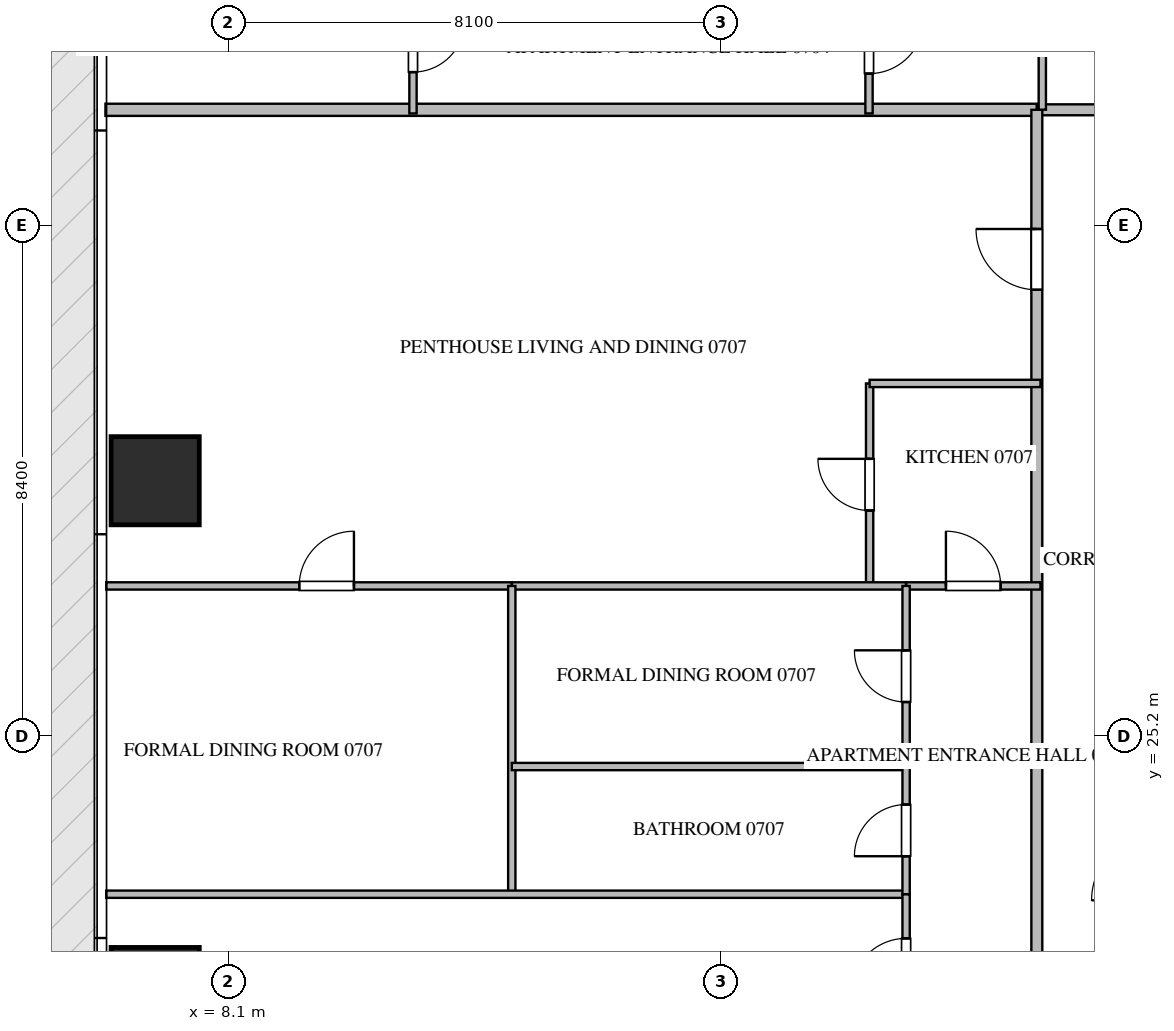
"""IFC4 building model, lengths in metres.
Left out: names, types, materials, properties, quantities, classifications, styles, units other than length and angle.
Written with IfcOpenShell. Run it as: python <this file> out.ifc"""

import sys

from ifc_helpers import new_model, si_unit, direction, frame, frame_2d, origin, origin_2d, place, context, subcontext, project, spatial, rectangle, extrude, source, transform, mapped, element, fill, save


model = new_model("IFC4")
c1 = context("Model", 3, precision=1e-05, world=origin(), true_north=direction((0.0, 1.0)))
c2 = subcontext(c1, "Body", "Model", "MODEL_VIEW")
j1 = project(units=[si_unit("LENGTHUNIT", "METRE"), si_unit("PLANEANGLEUNIT", "RADIAN")], contexts=[c1])
p1 = place(None, origin())
s1 = spatial("IfcSite", under=j1, at=p1, CompositionType="ELEMENT")
p2 = place(p1, origin())
s2 = spatial("IfcBuilding", under=s1, at=p2, CompositionType="ELEMENT")
p3 = place(p2, frame((0.0, 0.0, 34.2)))
s3 = spatial("IfcBuildingStorey", under=s2, at=p3, CompositionType="ELEMENT", Elevation=34.2)
m1 = source(origin(), c2, "Body", "SweptSolid", [
    extrude(rectangle(XDim=1.45, YDim=1.45, at=origin_2d()), origin(), (0.0, 0.0, 1.0), 3.75),
])
for number, where, z_axis, x_axis in (
    (1, (6.9, 21.0, -0.26), (0.0, 0.0, 1.0), (1.0, 0.0, 0.0)),
    (2, (6.9, 29.4, -0.26), (0.0, 0.0, 1.0), (1.0, 0.0, 0.0)),
):
    element("IfcColumn", number, at=place(p3, frame(where, z_axis=z_axis, x_axis=x_axis)), inside=s3, PredefinedType="COLUMN", context=c2, shape_type="MappedRepresentation", body=[
        mapped(m1, transform((0.0, 0.0, 0.0), scale=1.0)),
    ])
p4 = place(p3, frame((6.082, 35.5, 0.0), z_axis=(0.0, 0.0, 1.0), x_axis=(1.0, 0.0, 0.0)))
e3 = element("IfcWall", 3, at=p4, inside=s3, PredefinedType="PARTITIONING", context=c2, shape_type="SweptSolid", body=[
    extrude(rectangle(XDim=15.318, YDim=0.2, at=frame_2d((7.659, 0.0))), origin(), (0.0, 0.0, 1.0), 3.49),
])
p5 = place(p3, frame((21.402, 35.5, 0.0), z_axis=(0.0, 0.0, 1.0), x_axis=(1.0, 0.0, 0.0)))
e4 = element("IfcWall", 4, at=p5, inside=s3, PredefinedType="PARTITIONING", context=c2, shape_type="SweptSolid", body=[
    extrude(rectangle(XDim=21.996, YDim=0.18, at=frame_2d((10.998, 0.0))), origin(), (0.0, 0.0, 1.0), 3.49),
])
p6 = place(p5, frame((2.1, 0.0, 0.0)))
e5 = element("IfcOpeningElement", 5, at=p6, cuts=e4, PredefinedType="OPENING", context=c2, shape_type="SweptSolid", body=[
    extrude(rectangle(XDim=1.0, YDim=2.15, at=frame_2d((0.5, 1.075))), frame((0.0, 0.1, 0.0), z_axis=(0.0, -1.0, 0.0), x_axis=(1.0, 0.0, 0.0)), (0.0, 0.0, 1.0), 0.2),
])
p7 = place(p5, frame((14.277, 0.0, 0.0)))
e6 = element("IfcOpeningElement", 6, at=p7, cuts=e4, PredefinedType="OPENING", context=c2, shape_type="SweptSolid", body=[
    extrude(rectangle(XDim=1.0, YDim=2.15, at=frame_2d((0.5, 1.075))), frame((0.0, 0.1, 0.0), z_axis=(0.0, -1.0, 0.0), x_axis=(1.0, 0.0, 0.0)), (0.0, 0.0, 1.0), 0.2),
])
p8 = place(p5, frame((18.896, 0.0, 0.0)))
e7 = element("IfcOpeningElement", 7, at=p8, cuts=e4, PredefinedType="OPENING", context=c2, shape_type="SweptSolid", body=[
    extrude(rectangle(XDim=1.0, YDim=2.15, at=frame_2d((0.5, 1.075))), frame((0.0, 0.1, 0.0), z_axis=(0.0, -1.0, 0.0), x_axis=(1.0, 0.0, 0.0)), (0.0, 0.0, 1.0), 0.2),
])
p9 = place(p3, frame((21.4, 14.9, 0.0), z_axis=(0.0, 0.0, 1.0), x_axis=(0.0, 1.0, 0.0)))
e8 = element("IfcWall", 8, at=p9, inside=s3, PredefinedType="PARTITIONING", context=c2, shape_type="SweptSolid", body=[
    extrude(rectangle(XDim=20.6, YDim=0.18, at=frame_2d((10.3, 0.0))), origin(), (0.0, 0.0, 1.0), 3.49),
])
p10 = place(p9, frame((17.64, 0.0, 0.0)))
e9 = element("IfcOpeningElement", 9, at=p10, cuts=e8, PredefinedType="OPENING", context=c2, shape_type="SweptSolid", body=[
    extrude(rectangle(XDim=1.0, YDim=2.15, at=frame_2d((0.5, 1.075))), frame((0.0, 0.1, 0.0), z_axis=(0.0, -1.0, 0.0), x_axis=(1.0, 0.0, 0.0)), (0.0, 0.0, 1.0), 0.2),
])
p11 = place(p3, frame((21.49, 38.25, 0.0), z_axis=(0.0, 0.0, 1.0), x_axis=(0.0, -1.0, 0.0)))
e10 = element("IfcWall", 10, at=p11, inside=s3, PredefinedType="PARTITIONING", context=c2, shape_type="SweptSolid", body=[
    extrude(rectangle(XDim=2.748, YDim=0.12, at=frame_2d((1.374, 0.0))), origin(), (0.0, 0.0, 1.0), 3.49),
])
p12 = place(p3, frame((18.64, 37.65, 0.0), z_axis=(0.0, 0.0, 1.0), x_axis=(0.0, -1.0, 0.0)))
e11 = element("IfcWall", 11, at=p12, inside=s3, PredefinedType="PARTITIONING", context=c2, shape_type="SweptSolid", body=[
    extrude(rectangle(XDim=2.21, YDim=0.12, at=frame_2d((1.105, 0.0))), origin(), (0.0, 0.0, 1.0), 3.49),
])
p13 = place(p12, frame((0.655, 0.0, 0.0)))
e12 = element("IfcOpeningElement", 12, at=p13, cuts=e11, PredefinedType="OPENING", context=c2, shape_type="SweptSolid", body=[
    extrude(rectangle(XDim=0.9, YDim=2.1, at=frame_2d((0.45, 1.05))), frame((0.0, 0.07, 0.0), z_axis=(0.0, -1.0, 0.0), x_axis=(1.0, 0.0, 0.0)), (0.0, 0.0, 1.0), 0.14),
])
p14 = place(p3, frame((11.14, 37.65, 0.0), z_axis=(0.0, 0.0, 1.0), x_axis=(0.0, -1.0, 0.0)))
e13 = element("IfcWall", 13, at=p14, inside=s3, PredefinedType="PARTITIONING", context=c2, shape_type="SweptSolid", body=[
    extrude(rectangle(XDim=2.21, YDim=0.12, at=frame_2d((1.105, 0.0))), origin(), (0.0, 0.0, 1.0), 3.49),
])
p15 = place(p14, frame((0.68, 0.0, 0.0)))
e14 = element("IfcOpeningElement", 14, at=p15, cuts=e13, PredefinedType="OPENING", context=c2, shape_type="SweptSolid", body=[
    extrude(rectangle(XDim=0.85, YDim=2.1, at=frame_2d((0.425, 1.05))), frame((0.0, 0.07, 0.0), z_axis=(0.0, -1.0, 0.0), x_axis=(1.0, 0.0, 0.0)), (0.0, 0.0, 1.0), 0.14),
])
p16 = place(p3, frame((18.65, 27.67, 0.0), z_axis=(0.0, 0.0, 1.0), x_axis=(0.0, 1.0, 0.0)))
e15 = element("IfcWall", 15, at=p16, inside=s3, PredefinedType="PARTITIONING", context=c2, shape_type="SweptSolid", body=[
    extrude(rectangle(XDim=3.33, YDim=0.12, at=frame_2d((1.665, 0.0))), origin(), (0.0, 0.0, 1.0), 3.49),
])
p17 = place(p16, frame((1.24, 0.0, 0.0)))
e16 = element("IfcOpeningElement", 16, at=p17, cuts=e15, PredefinedType="OPENING", context=c2, shape_type="SweptSolid", body=[
    extrude(rectangle(XDim=0.85, YDim=2.1, at=frame_2d((0.425, 1.05))), frame((0.0, 0.07, 0.0), z_axis=(0.0, -1.0, 0.0), x_axis=(1.0, 0.0, 0.0)), (0.0, 0.0, 1.0), 0.14),
])
p18 = place(p3, frame((18.65, 31.0, 0.0), z_axis=(0.0, 0.0, 1.0), x_axis=(1.0, 0.0, 0.0)))
e17 = element("IfcWall", 17, at=p18, inside=s3, PredefinedType="PARTITIONING", context=c2, shape_type="SweptSolid", body=[
    extrude(rectangle(XDim=2.81, YDim=0.12, at=frame_2d((1.405, 0.0))), origin(), (0.0, 0.0, 1.0), 3.49),
])
p19 = place(p3, frame((19.25, 27.67, 0.0), z_axis=(0.0, 0.0, 1.0), x_axis=(1.0, 0.0, 0.0)))
e18 = element("IfcWall", 18, at=p19, inside=s3, PredefinedType="PARTITIONING", context=c2, shape_type="SweptSolid", body=[
    extrude(rectangle(XDim=2.21, YDim=0.12, at=frame_2d((1.105, 0.0))), origin(), (0.0, 0.0, 1.0), 3.49),
])
p20 = place(p19, frame((0.655, 0.0, 0.0)))
e19 = element("IfcOpeningElement", 19, at=p20, cuts=e18, PredefinedType="OPENING", context=c2, shape_type="SweptSolid", body=[
    extrude(rectangle(XDim=0.9, YDim=2.1, at=frame_2d((0.45, 1.05))), frame((0.0, 0.07, 0.0), z_axis=(0.0, -1.0, 0.0), x_axis=(1.0, 0.0, 0.0)), (0.0, 0.0, 1.0), 0.14),
])
p21 = place(p3, frame((6.095, 27.67, 0.0), z_axis=(0.0, 0.0, 1.0), x_axis=(1.0, 0.0, 0.0)))
e20 = element("IfcWall", 20, at=p21, inside=s3, PredefinedType="PARTITIONING", context=c2, shape_type="SweptSolid", body=[
    extrude(rectangle(XDim=6.67, YDim=0.12, at=frame_2d((3.335, 0.0))), origin(), (0.0, 0.0, 1.0), 3.49),
])
p22 = place(p21, frame((3.174, 0.0, 0.0)))
e21 = element("IfcOpeningElement", 21, at=p22, cuts=e20, PredefinedType="OPENING", context=c2, shape_type="SweptSolid", body=[
    extrude(rectangle(XDim=0.9, YDim=2.1, at=frame_2d((0.45, 1.05))), frame((0.0, 0.07, 0.0), z_axis=(0.0, -1.0, 0.0), x_axis=(1.0, 0.0, 0.0)), (0.0, 0.0, 1.0), 0.14),
])
p23 = place(p3, frame((12.767, 27.67, 0.0), z_axis=(0.0, 0.0, 1.0), x_axis=(1.0, 0.0, 0.0)))
e22 = element("IfcWall", 22, at=p23, inside=s3, PredefinedType="PARTITIONING", context=c2, shape_type="SweptSolid", body=[
    extrude(rectangle(XDim=6.481, YDim=0.12, at=frame_2d((3.24, 0.0))), origin(), (0.0, 0.0, 1.0), 3.49),
])
p24 = place(p3, frame((12.765, 22.6, 0.0), z_axis=(0.0, 0.0, 1.0), x_axis=(0.0, 1.0, 0.0)))
e23 = element("IfcWall", 23, at=p24, inside=s3, PredefinedType="PARTITIONING", context=c2, shape_type="SweptSolid", body=[
    extrude(rectangle(XDim=5.07, YDim=0.12, at=frame_2d((2.535, 0.0))), origin(), (0.0, 0.0, 1.0), 3.49),
])
p25 = place(p3, frame((6.095, 22.6, 0.0), z_axis=(0.0, 0.0, 1.0), x_axis=(1.0, 0.0, 0.0)))
e24 = element("IfcWall", 24, at=p25, inside=s3, PredefinedType="PARTITIONING", context=c2, shape_type="SweptSolid", body=[
    extrude(rectangle(XDim=13.155, YDim=0.12, at=frame_2d((6.578, 0.0))), origin(), (0.0, 0.0, 1.0), 3.49),
])
p26 = place(p3, frame((12.765, 24.7, 0.0), z_axis=(0.0, 0.0, 1.0), x_axis=(1.0, 0.0, 0.0)))
e25 = element("IfcWall", 25, at=p26, inside=s3, PredefinedType="PARTITIONING", context=c2, shape_type="SweptSolid", body=[
    extrude(rectangle(XDim=6.485, YDim=0.12, at=frame_2d((3.243, 0.0))), origin(), (0.0, 0.0, 1.0), 3.49),
])
p27 = place(p3, frame((19.25, 22.6, 0.0), z_axis=(0.0, 0.0, 1.0), x_axis=(0.0, 1.0, 0.0)))
e26 = element("IfcWall", 26, at=p27, inside=s3, PredefinedType="PARTITIONING", context=c2, shape_type="SweptSolid", body=[
    extrude(rectangle(XDim=2.1, YDim=0.12, at=frame_2d((1.05, 0.0))), origin(), (0.0, 0.0, 1.0), 3.49),
])
p28 = place(p27, frame((0.625, 0.0, 0.0)))
e27 = element("IfcOpeningElement", 27, at=p28, cuts=e26, PredefinedType="OPENING", context=c2, shape_type="SweptSolid", body=[
    extrude(rectangle(XDim=0.85, YDim=2.1, at=frame_2d((0.425, 1.05))), frame((0.0, 0.07, 0.0), z_axis=(0.0, -1.0, 0.0), x_axis=(1.0, 0.0, 0.0)), (0.0, 0.0, 1.0), 0.14),
])
p29 = place(p3, frame((19.25, 24.702, 0.0), z_axis=(0.0, 0.0, 1.0), x_axis=(0.0, 1.0, 0.0)))
e28 = element("IfcWall", 28, at=p29, inside=s3, PredefinedType="PARTITIONING", context=c2, shape_type="SweptSolid", body=[
    extrude(rectangle(XDim=2.968, YDim=0.12, at=frame_2d((1.484, 0.0))), origin(), (0.0, 0.0, 1.0), 3.49),
])
p30 = place(p29, frame((1.059, 0.0, 0.0)))
e29 = element("IfcOpeningElement", 29, at=p30, cuts=e28, PredefinedType="OPENING", context=c2, shape_type="SweptSolid", body=[
    extrude(rectangle(XDim=0.85, YDim=2.1, at=frame_2d((0.425, 1.05))), frame((0.0, 0.07, 0.0), z_axis=(0.0, -1.0, 0.0), x_axis=(1.0, 0.0, 0.0)), (0.0, 0.0, 1.0), 0.14),
])
p31 = place(p3, frame((19.25, 20.25, 0.0), z_axis=(0.0, 0.0, 1.0), x_axis=(0.0, 1.0, 0.0)))
e30 = element("IfcWall", 30, at=p31, inside=s3, PredefinedType="PARTITIONING", context=c2, shape_type="SweptSolid", body=[
    extrude(rectangle(XDim=2.348, YDim=0.12, at=frame_2d((1.174, 0.0))), origin(), (0.0, 0.0, 1.0), 3.49),
])
p32 = place(p31, frame((0.724, 0.0, 0.0)))
e31 = element("IfcOpeningElement", 31, at=p32, cuts=e30, PredefinedType="OPENING", context=c2, shape_type="SweptSolid", body=[
    extrude(rectangle(XDim=0.9, YDim=2.1, at=frame_2d((0.45, 1.05))), frame((0.0, 0.07, 0.0), z_axis=(0.0, -1.0, 0.0), x_axis=(1.0, 0.0, 0.0)), (0.0, 0.0, 1.0), 0.14),
])
m2 = source(origin(), c2, "Body", "SweptSolid", [
    extrude(rectangle(XDim=1.0, YDim=2.15, at=frame_2d((0.5, 1.075))), frame((0.0, 0.025, 0.0), z_axis=(0.0, -1.0, 0.0), x_axis=(1.0, 0.0, 0.0)), (0.0, 0.0, 1.0), 0.05),
])
p33 = place(p10, origin())
e32 = element("IfcDoor", 32, at=p33, inside=s3, OperationType="SINGLE_SWING_RIGHT", PredefinedType="DOOR", context=c2, shape_type="MappedRepresentation", body=[
    mapped(m2, transform((0.0, 0.0, 0.0), scale=1.0)),
])
fill(e9, e32)
m3 = source(origin(), c2, "Body", "SweptSolid", [
    extrude(rectangle(XDim=0.9, YDim=2.1, at=frame_2d((0.45, 1.05))), frame((0.0, 0.025, 0.0), z_axis=(0.0, -1.0, 0.0), x_axis=(1.0, 0.0, 0.0)), (0.0, 0.0, 1.0), 0.05),
])
p34 = place(p13, origin())
e33 = element("IfcDoor", 33, at=p34, inside=s3, OperationType="SINGLE_SWING_LEFT", PredefinedType="DOOR", context=c2, shape_type="MappedRepresentation", body=[
    mapped(m3, transform((0.0, 0.0, 0.0), scale=1.0)),
])
fill(e12, e33)
m4 = source(origin(), c2, "Body", "SweptSolid", [
    extrude(rectangle(XDim=0.85, YDim=2.1, at=frame_2d((0.425, 1.05))), frame((0.0, 0.025, 0.0), z_axis=(0.0, -1.0, 0.0), x_axis=(1.0, 0.0, 0.0)), (0.0, 0.0, 1.0), 0.05),
])
p35 = place(p15, origin())
e34 = element("IfcDoor", 34, at=p35, inside=s3, OperationType="SINGLE_SWING_LEFT", PredefinedType="DOOR", context=c2, shape_type="MappedRepresentation", body=[
    mapped(m4, transform((0.0, 0.0, 0.0), scale=1.0)),
])
fill(e14, e34)
p36 = place(p17, origin())
e35 = element("IfcDoor", 35, at=p36, inside=s3, OperationType="SINGLE_SWING_RIGHT", PredefinedType="DOOR", context=c2, shape_type="MappedRepresentation", body=[
    mapped(m4, transform((0.0, 0.0, 0.0), scale=1.0)),
])
fill(e16, e35)
p37 = place(p20, origin())
e36 = element("IfcDoor", 36, at=p37, inside=s3, OperationType="SINGLE_SWING_LEFT", PredefinedType="DOOR", context=c2, shape_type="MappedRepresentation", body=[
    mapped(m3, transform((0.0, 0.0, 0.0), scale=1.0)),
])
fill(e19, e36)
p38 = place(p22, origin())
e37 = element("IfcDoor", 37, at=p38, inside=s3, OperationType="SINGLE_SWING_RIGHT", PredefinedType="DOOR", context=c2, shape_type="MappedRepresentation", body=[
    mapped(m3, transform((0.0, 0.0, 0.0), scale=1.0)),
])
fill(e21, e37)
p39 = place(p28, origin())
e38 = element("IfcDoor", 38, at=p39, inside=s3, OperationType="SINGLE_SWING_LEFT", PredefinedType="DOOR", context=c2, shape_type="MappedRepresentation", body=[
    mapped(m4, transform((0.0, 0.0, 0.0), scale=1.0)),
])
fill(e27, e38)
p40 = place(p30, origin())
e39 = element("IfcDoor", 39, at=p40, inside=s3, OperationType="SINGLE_SWING_RIGHT", PredefinedType="DOOR", context=c2, shape_type="MappedRepresentation", body=[
    mapped(m4, transform((0.0, 0.0, 0.0), scale=1.0)),
])
fill(e29, e39)
p41 = place(p32, origin())
e40 = element("IfcDoor", 40, at=p41, inside=s3, OperationType="SINGLE_SWING_LEFT", PredefinedType="DOOR", context=c2, shape_type="MappedRepresentation", body=[
    mapped(m3, transform((0.0, 0.0, 0.0), scale=1.0)),
])
fill(e31, e40)
save(model, sys.argv[1])
